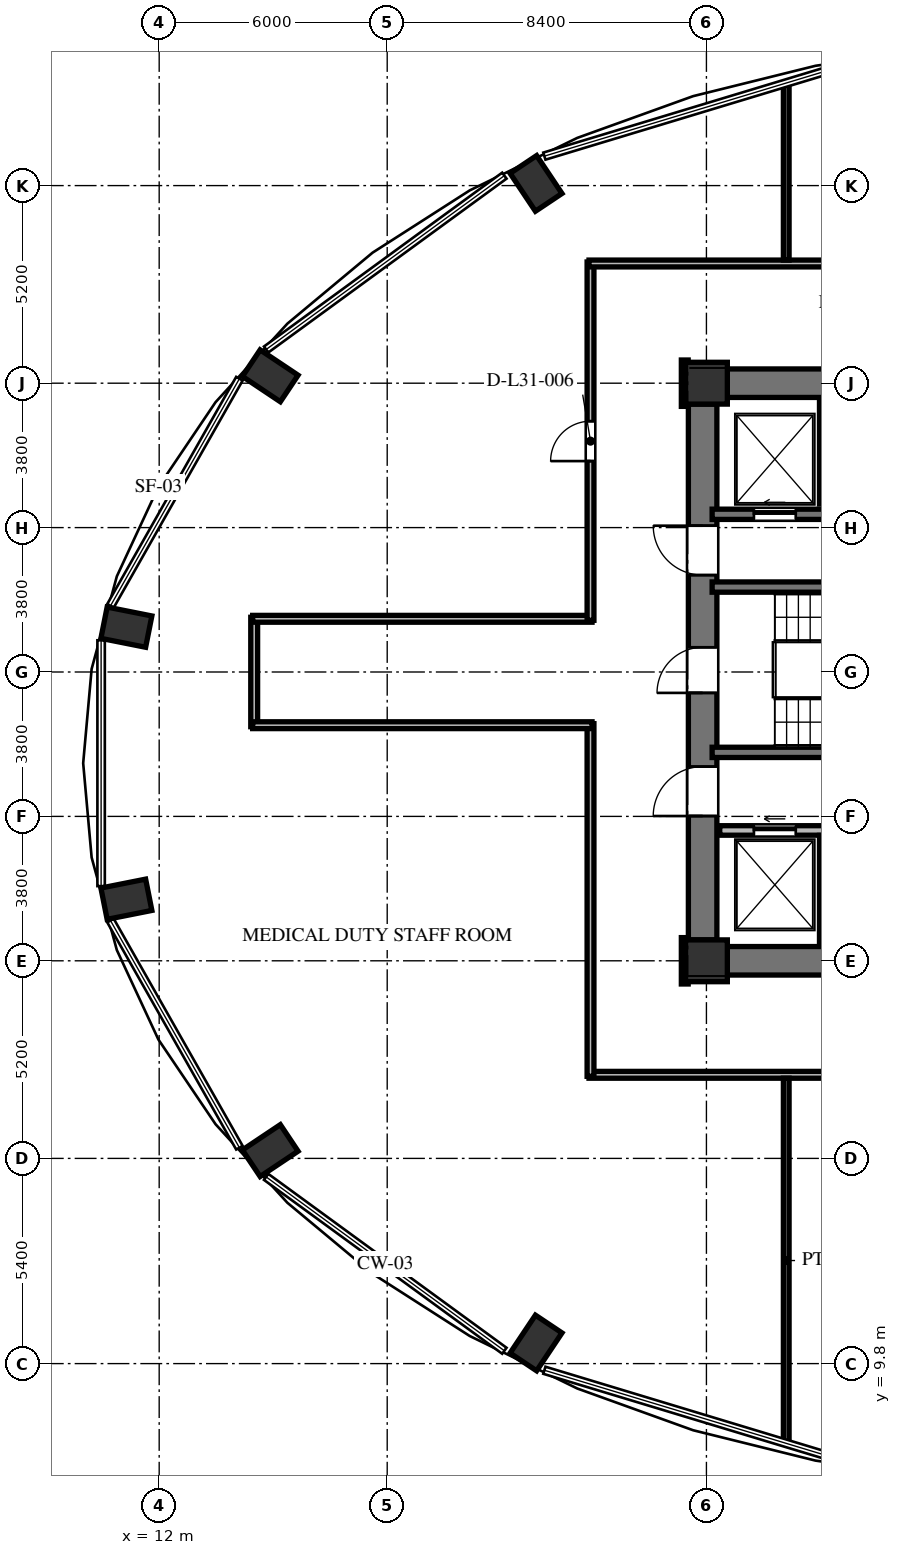
"""IFC4 building model, lengths in metres.
Left out: names, types, materials, properties, quantities, classifications, styles, units other than length and angle.
Written with IfcOpenShell. Run it as: python <this file> out.ifc"""

import sys

from ifc_helpers import new_model, si_unit, direction, frame, frame_2d, origin, origin_2d, place, context, subcontext, project, spatial, rectangle, extrude, element, fill, save


model = new_model("IFC4")
c1 = context("Model", 3, precision=1e-05, world=origin(), true_north=direction((0.0, 1.0)))
c2 = subcontext(c1, "Body", "Model", "MODEL_VIEW")
j1 = project(units=[si_unit("LENGTHUNIT", "METRE"), si_unit("PLANEANGLEUNIT", "RADIAN")], contexts=[c1])
p1 = place(None, origin())
s1 = spatial("IfcSite", under=j1, at=p1, CompositionType="ELEMENT")
p2 = place(p1, origin())
s2 = spatial("IfcBuilding", under=s1, at=p2, CompositionType="ELEMENT")
p3 = place(p2, frame((0.0, 0.0, 121.872)))
s3 = spatial("IfcBuildingStorey", under=s2, at=p3, CompositionType="ELEMENT", Elevation=121.872)
for number, where, z_axis, x_axis in (
    (1, (21.916, 40.857, 0.0), (0.0, 0.0, 1.0), (-0.556, 0.831, 0.0)),
    (2, (14.922, 35.795, 0.0), (0.0, 0.0, 1.0), (-0.831, 0.556, 0.0)),
    (3, (11.137, 29.18, 0.0), (0.0, 0.0, 1.0), (-0.981, 0.195, 0.0)),
    (4, (11.137, 22.02, 0.0), (0.0, 0.0, 1.0), (-0.981, -0.195, 0.0)),
    (5, (14.922, 15.405, 0.0), (0.0, 0.0, 1.0), (-0.831, -0.556, 0.0)),
    (6, (21.916, 10.343, 0.0), (0.0, 0.0, 1.0), (-0.556, -0.831, 0.0)),
):
    element("IfcColumn", number, at=place(p3, frame(where, z_axis=z_axis, x_axis=x_axis)), inside=s3, PredefinedType="COLUMN", context=c2, shape_type="SweptSolid", body=[
        extrude(rectangle(XDim=1.2, YDim=0.84, at=origin_2d()), origin(), (0.0, 0.0, 1.0), 3.648),
    ])
for number, where, z_axis, x_axis in (
    (7, (26.4, 20.4, 0.0), (0.0, 0.0, 1.0), (1.0, 0.0, 0.0)),
    (8, (26.4, 35.6, 0.0), (0.0, 0.0, 1.0), (1.0, 0.0, 0.0)),
):
    element("IfcColumn", number, at=place(p3, frame(where, z_axis=z_axis, x_axis=x_axis)), inside=s3, PredefinedType="COLUMN", context=c2, shape_type="SweptSolid", body=[
        extrude(rectangle(XDim=1.1, YDim=1.1, at=origin_2d()), origin(), (0.0, 0.0, 1.0), 3.648),
    ])
p4 = place(p3, frame((26.3, 20.95, 0.0), z_axis=(0.0, 0.0, 1.0), x_axis=(0.0, 1.0, 0.0)))
e9 = element("IfcWall", 9, at=p4, inside=s3, PredefinedType="SHEAR", context=c2, shape_type="SweptSolid", body=[
    extrude(rectangle(XDim=14.1, YDim=0.75, at=frame_2d((7.05, 0.0))), origin(), (0.0, 0.0, 1.0), 3.648),
])
p5 = place(p4, frame((6.5, 0.0, 0.0)))
e10 = element("IfcOpeningElement", 10, at=p5, cuts=e9, PredefinedType="OPENING", context=c2, shape_type="SweptSolid", body=[
    extrude(rectangle(XDim=1.2, YDim=2.15, at=frame_2d((0.6, 1.075))), frame((0.0, 0.385, 0.0), z_axis=(0.0, -1.0, 0.0), x_axis=(1.0, 0.0, 0.0)), (0.0, 0.0, 1.0), 0.77),
])
p6 = place(p4, frame((9.6, 0.0, 0.0)))
e11 = element("IfcOpeningElement", 11, at=p6, cuts=e9, PredefinedType="OPENING", context=c2, shape_type="SweptSolid", body=[
    extrude(rectangle(XDim=1.3, YDim=2.2, at=frame_2d((0.65, 1.1))), frame((0.0, 0.385, 0.0), z_axis=(0.0, -1.0, 0.0), x_axis=(1.0, 0.0, 0.0)), (0.0, 0.0, 1.0), 0.77),
])
p7 = place(p4, frame((3.26, 0.0, 0.0)))
e12 = element("IfcOpeningElement", 12, at=p7, cuts=e9, PredefinedType="OPENING", context=c2, shape_type="SweptSolid", body=[
    extrude(rectangle(XDim=1.3, YDim=2.2, at=frame_2d((0.65, 1.1))), frame((0.0, 0.385, 0.0), z_axis=(0.0, -1.0, 0.0), x_axis=(1.0, 0.0, 0.0)), (0.0, 0.0, 1.0), 0.77),
])
for number, where, z_axis, x_axis in (
    (13, (26.95, 20.4, 0.0), (0.0, 0.0, 1.0), (1.0, 0.0, 0.0)),
    (14, (26.95, 35.6, 0.0), (0.0, 0.0, 1.0), (1.0, 0.0, 0.0)),
):
    element("IfcWall", number, at=place(p3, frame(where, z_axis=z_axis, x_axis=x_axis)), inside=s3, PredefinedType="SHEAR", context=c2, shape_type="SweptSolid", body=[
        extrude(rectangle(XDim=5.375, YDim=0.75, at=frame_2d((2.688, 0.0))), origin(), (0.0, 0.0, 1.0), 3.648),
    ])
for number, where, z_axis, x_axis in (
    (15, (26.55, 30.235, 0.0), (0.0, 0.0, 1.0), (1.0, 0.0, 0.0)),
    (16, (26.55, 25.885, 0.0), (0.0, 0.0, 1.0), (1.0, 0.0, 0.0)),
):
    element("IfcWall", number, at=place(p3, frame(where, z_axis=z_axis, x_axis=x_axis)), inside=s3, PredefinedType="SHEAR", context=c2, shape_type="SweptSolid", body=[
        extrude(rectangle(XDim=7.985, YDim=0.27, at=frame_2d((3.992, 0.0))), origin(), (0.0, 0.0, 1.0), 3.648),
    ])
p8 = place(p3, frame((26.55, 32.15, 0.0), z_axis=(0.0, 0.0, 1.0), x_axis=(1.0, 0.0, 0.0)))
e17 = element("IfcWall", 17, at=p8, inside=s3, PredefinedType="SHEAR", context=c2, shape_type="SweptSolid", body=[
    extrude(rectangle(XDim=16.4, YDim=0.27, at=frame_2d((8.2, 0.0))), origin(), (0.0, 0.0, 1.0), 3.648),
])
p9 = place(p8, frame((1.1, 0.0, 0.0)))
e18 = element("IfcOpeningElement", 18, at=p9, cuts=e17, PredefinedType="OPENING", context=c2, shape_type="SweptSolid", body=[
    extrude(rectangle(XDim=1.1, YDim=2.2, at=frame_2d((0.55, 1.1))), frame((0.0, 0.145, 0.0), z_axis=(0.0, -1.0, 0.0), x_axis=(1.0, 0.0, 0.0)), (0.0, 0.0, 1.0), 0.29),
])
p10 = place(p8, frame((3.7, 0.0, 0.0)))
e19 = element("IfcOpeningElement", 19, at=p10, cuts=e17, PredefinedType="OPENING", context=c2, shape_type="SweptSolid", body=[
    extrude(rectangle(XDim=1.1, YDim=2.2, at=frame_2d((0.55, 1.1))), frame((0.0, 0.145, 0.0), z_axis=(0.0, -1.0, 0.0), x_axis=(1.0, 0.0, 0.0)), (0.0, 0.0, 1.0), 0.29),
])
p11 = place(p8, frame((6.5, 0.0, 0.0)))
e20 = element("IfcOpeningElement", 20, at=p11, cuts=e17, PredefinedType="OPENING", context=c2, shape_type="SweptSolid", body=[
    extrude(rectangle(XDim=1.1, YDim=2.2, at=frame_2d((0.55, 1.1))), frame((0.0, 0.145, 0.0), z_axis=(0.0, -1.0, 0.0), x_axis=(1.0, 0.0, 0.0)), (0.0, 0.0, 1.0), 0.29),
])
p12 = place(p8, frame((9.1, 0.0, 0.0)))
e21 = element("IfcOpeningElement", 21, at=p12, cuts=e17, PredefinedType="OPENING", context=c2, shape_type="SweptSolid", body=[
    extrude(rectangle(XDim=1.1, YDim=2.2, at=frame_2d((0.55, 1.1))), frame((0.0, 0.145, 0.0), z_axis=(0.0, -1.0, 0.0), x_axis=(1.0, 0.0, 0.0)), (0.0, 0.0, 1.0), 0.29),
])
p13 = place(p8, frame((11.9, 0.0, 0.0)))
e22 = element("IfcOpeningElement", 22, at=p13, cuts=e17, PredefinedType="OPENING", context=c2, shape_type="SweptSolid", body=[
    extrude(rectangle(XDim=1.1, YDim=2.2, at=frame_2d((0.55, 1.1))), frame((0.0, 0.145, 0.0), z_axis=(0.0, -1.0, 0.0), x_axis=(1.0, 0.0, 0.0)), (0.0, 0.0, 1.0), 0.29),
])
p14 = place(p8, frame((14.5, 0.0, 0.0)))
e23 = element("IfcOpeningElement", 23, at=p14, cuts=e17, PredefinedType="OPENING", context=c2, shape_type="SweptSolid", body=[
    extrude(rectangle(XDim=1.1, YDim=2.2, at=frame_2d((0.55, 1.1))), frame((0.0, 0.145, 0.0), z_axis=(0.0, -1.0, 0.0), x_axis=(1.0, 0.0, 0.0)), (0.0, 0.0, 1.0), 0.29),
])
p15 = place(p3, frame((26.75, 23.83, 0.0), z_axis=(0.0, 0.0, 1.0), x_axis=(1.0, 0.0, 0.0)))
e24 = element("IfcWall", 24, at=p15, inside=s3, PredefinedType="SOLIDWALL", context=c2, shape_type="SweptSolid", body=[
    extrude(rectangle(XDim=16.2, YDim=0.25, at=frame_2d((8.1, 0.0))), origin(), (0.0, 0.0, 1.0), 3.428),
])
p16 = place(p15, frame((0.9, 0.0, 0.0)))
e25 = element("IfcOpeningElement", 25, at=p16, cuts=e24, PredefinedType="OPENING", context=c2, shape_type="SweptSolid", body=[
    extrude(rectangle(XDim=1.1, YDim=2.2, at=frame_2d((0.55, 1.1))), frame((0.0, 0.135, 0.0), z_axis=(0.0, -1.0, 0.0), x_axis=(1.0, 0.0, 0.0)), (0.0, 0.0, 1.0), 0.27),
])
p17 = place(p15, frame((3.5, 0.0, 0.0)))
e26 = element("IfcOpeningElement", 26, at=p17, cuts=e24, PredefinedType="OPENING", context=c2, shape_type="SweptSolid", body=[
    extrude(rectangle(XDim=1.1, YDim=2.2, at=frame_2d((0.55, 1.1))), frame((0.0, 0.135, 0.0), z_axis=(0.0, -1.0, 0.0), x_axis=(1.0, 0.0, 0.0)), (0.0, 0.0, 1.0), 0.27),
])
p18 = place(p15, frame((6.3, 0.0, 0.0)))
e27 = element("IfcOpeningElement", 27, at=p18, cuts=e24, PredefinedType="OPENING", context=c2, shape_type="SweptSolid", body=[
    extrude(rectangle(XDim=1.1, YDim=2.2, at=frame_2d((0.55, 1.1))), frame((0.0, 0.135, 0.0), z_axis=(0.0, -1.0, 0.0), x_axis=(1.0, 0.0, 0.0)), (0.0, 0.0, 1.0), 0.27),
])
p19 = place(p15, frame((8.9, 0.0, 0.0)))
e28 = element("IfcOpeningElement", 28, at=p19, cuts=e24, PredefinedType="OPENING", context=c2, shape_type="SweptSolid", body=[
    extrude(rectangle(XDim=1.1, YDim=2.2, at=frame_2d((0.55, 1.1))), frame((0.0, 0.135, 0.0), z_axis=(0.0, -1.0, 0.0), x_axis=(1.0, 0.0, 0.0)), (0.0, 0.0, 1.0), 0.27),
])
p20 = place(p15, frame((11.7, 0.0, 0.0)))
e29 = element("IfcOpeningElement", 29, at=p20, cuts=e24, PredefinedType="OPENING", context=c2, shape_type="SweptSolid", body=[
    extrude(rectangle(XDim=1.1, YDim=2.2, at=frame_2d((0.55, 1.1))), frame((0.0, 0.135, 0.0), z_axis=(0.0, -1.0, 0.0), x_axis=(1.0, 0.0, 0.0)), (0.0, 0.0, 1.0), 0.27),
])
p21 = place(p15, frame((14.15, 0.0, 0.0)))
e30 = element("IfcOpeningElement", 30, at=p21, cuts=e24, PredefinedType="OPENING", context=c2, shape_type="SweptSolid", body=[
    extrude(rectangle(XDim=1.4, YDim=2.3, at=frame_2d((0.7, 1.15))), frame((0.0, 0.135, 0.0), z_axis=(0.0, -1.0, 0.0), x_axis=(1.0, 0.0, 0.0)), (0.0, 0.0, 1.0), 0.27),
])
p22 = place(p3, frame((29.5, 32.42, 0.0), z_axis=(0.0, 0.0, 1.0), x_axis=(0.0, 1.0, 0.0)))
e31 = element("IfcWall", 31, at=p22, inside=s3, PredefinedType="SOLIDWALL", context=c2, shape_type="SweptSolid", body=[
    extrude(rectangle(XDim=2.68, YDim=0.25, at=frame_2d((1.34, 0.0))), origin(), (0.0, 0.0, 1.0), 3.428),
])
p23 = place(p3, frame((29.5, 20.9, 0.0), z_axis=(0.0, 0.0, 1.0), x_axis=(0.0, 1.0, 0.0)))
e32 = element("IfcWall", 32, at=p23, inside=s3, PredefinedType="SOLIDWALL", context=c2, shape_type="SweptSolid", body=[
    extrude(rectangle(XDim=2.8, YDim=0.25, at=frame_2d((1.4, 0.0))), origin(), (0.0, 0.0, 1.0), 3.428),
])
p24 = place(p3, frame((14.5, 26.56, 0.0), z_axis=(0.0, 0.0, 1.0), x_axis=(0.0, 1.0, 0.0)))
e33 = element("IfcWall", 33, at=p24, inside=s3, PredefinedType="PARTITIONING", context=c2, shape_type="SweptSolid", body=[
    extrude(rectangle(XDim=2.88, YDim=0.18, at=frame_2d((1.44, 0.0))), origin(), (0.0, 0.0, 1.0), 3.013),
])
p25 = place(p3, frame((14.46, 29.4, 0.0), z_axis=(0.0, 0.0, 1.0), x_axis=(1.0, 0.0, 0.0)))
e34 = element("IfcWall", 34, at=p25, inside=s3, PredefinedType="PARTITIONING", context=c2, shape_type="SweptSolid", body=[
    extrude(rectangle(XDim=8.93, YDim=0.18, at=frame_2d((4.465, 0.0))), origin(), (0.0, 0.0, 1.0), 3.428),
])
p26 = place(p3, frame((23.35, 29.36, 0.0), z_axis=(0.0, 0.0, 1.0), x_axis=(0.0, 1.0, 0.0)))
e35 = element("IfcWall", 35, at=p26, inside=s3, PredefinedType="PARTITIONING", context=c2, shape_type="SweptSolid", body=[
    extrude(rectangle(XDim=9.43, YDim=0.18, at=frame_2d((4.715, 0.0))), origin(), (0.0, 0.0, 1.0), 3.428),
])
p27 = place(p26, frame((4.19, 0.0, 0.0)))
e36 = element("IfcOpeningElement", 36, at=p27, cuts=e35, PredefinedType="OPENING", context=c2, shape_type="SweptSolid", body=[
    extrude(rectangle(XDim=1.05, YDim=2.15, at=frame_2d((0.525, 1.075))), frame((0.0, 0.1, 0.0), z_axis=(0.0, -1.0, 0.0), x_axis=(1.0, 0.0, 0.0)), (0.0, 0.0, 1.0), 0.2),
])
p28 = place(p3, frame((23.31, 38.75, 0.0), z_axis=(0.0, 0.0, 1.0), x_axis=(1.0, 0.0, 0.0)))
e37 = element("IfcWall", 37, at=p28, inside=s3, PredefinedType="PARTITIONING", context=c2, shape_type="SweptSolid", body=[
    extrude(rectangle(XDim=29.88, YDim=0.18, at=frame_2d((14.94, 0.0))), origin(), (0.0, 0.0, 1.0), 3.053),
])
p29 = place(p28, frame((26.101, 0.0, 0.0)))
e38 = element("IfcOpeningElement", 38, at=p29, cuts=e37, PredefinedType="OPENING", context=c2, shape_type="SweptSolid", body=[
    extrude(rectangle(XDim=1.05, YDim=2.15, at=frame_2d((0.525, 1.075))), frame((0.0, 0.1, 0.0), z_axis=(0.0, -1.0, 0.0), x_axis=(1.0, 0.0, 0.0)), (0.0, 0.0, 1.0), 0.2),
])
p30 = place(p28, frame((15.74, 0.0, 0.0)))
e39 = element("IfcOpeningElement", 39, at=p30, cuts=e37, PredefinedType="OPENING", context=c2, shape_type="SweptSolid", body=[
    extrude(rectangle(XDim=1.4, YDim=2.2, at=frame_2d((0.7, 1.1))), frame((0.0, 0.1, 0.0), z_axis=(0.0, -1.0, 0.0), x_axis=(1.0, 0.0, 0.0)), (0.0, 0.0, 1.0), 0.2),
])
p31 = place(p28, frame((6.665, 0.0, 0.0)))
e40 = element("IfcOpeningElement", 40, at=p31, cuts=e37, PredefinedType="OPENING", context=c2, shape_type="SweptSolid", body=[
    extrude(rectangle(XDim=1.05, YDim=2.15, at=frame_2d((0.525, 1.075))), frame((0.0, 0.1, 0.0), z_axis=(0.0, -1.0, 0.0), x_axis=(1.0, 0.0, 0.0)), (0.0, 0.0, 1.0), 0.2),
])
for number, where, z_axis, x_axis in (
    (41, (25.83, 36.21, 0.0), (0.0, 0.0, 1.0), (0.0, -1.0, 0.0)),
    (42, (25.83, 21.01, 0.0), (0.0, 0.0, 1.0), (0.0, -1.0, 0.0)),
):
    element("IfcWall", number, at=place(p3, frame(where, z_axis=z_axis, x_axis=x_axis)), inside=s3, PredefinedType="PARTITIONING", context=c2, shape_type="SweptSolid", body=[
        extrude(rectangle(XDim=1.22, YDim=0.18, at=frame_2d((0.61, 0.0))), origin(), (0.0, 0.0, 1.0), 3.428),
    ])
p32 = place(p3, frame((45.24, 17.4, 0.0), z_axis=(0.0, 0.0, 1.0), x_axis=(-1.0, 0.0, 0.0)))
e43 = element("IfcWall", 43, at=p32, inside=s3, PredefinedType="PARTITIONING", context=c2, shape_type="SweptSolid", body=[
    extrude(rectangle(XDim=21.93, YDim=0.18, at=frame_2d((10.965, 0.0))), origin(), (0.0, 0.0, 1.0), 3.053),
])
p33 = place(p32, frame((8.004, 0.0, 0.0)))
e44 = element("IfcOpeningElement", 44, at=p33, cuts=e43, PredefinedType="OPENING", context=c2, shape_type="SweptSolid", body=[
    extrude(rectangle(XDim=1.05, YDim=2.15, at=frame_2d((0.525, 1.075))), frame((0.0, 0.1, 0.0), z_axis=(0.0, -1.0, 0.0), x_axis=(1.0, 0.0, 0.0)), (0.0, 0.0, 1.0), 0.2),
])
p34 = place(p3, frame((23.35, 17.36, 0.0), z_axis=(0.0, 0.0, 1.0), x_axis=(0.0, 1.0, 0.0)))
e45 = element("IfcWall", 45, at=p34, inside=s3, PredefinedType="PARTITIONING", context=c2, shape_type="SweptSolid", body=[
    extrude(rectangle(XDim=9.28, YDim=0.18, at=frame_2d((4.64, 0.0))), origin(), (0.0, 0.0, 1.0), 3.428),
])
p35 = place(p3, frame((23.39, 26.6, 0.0), z_axis=(0.0, 0.0, 1.0), x_axis=(-1.0, 0.0, 0.0)))
e46 = element("IfcWall", 46, at=p35, inside=s3, PredefinedType="PARTITIONING", context=c2, shape_type="SweptSolid", body=[
    extrude(rectangle(XDim=8.93, YDim=0.18, at=frame_2d((4.465, 0.0))), origin(), (0.0, 0.0, 1.0), 3.428),
])
p36 = place(p3, frame((28.5, 38.84, 0.0), z_axis=(0.0, 0.0, 1.0), x_axis=(0.0, 1.0, 0.0)))
e47 = element("IfcWall", 47, at=p36, inside=s3, PredefinedType="PARTITIONING", context=c2, shape_type="SweptSolid", body=[
    extrude(rectangle(XDim=4.645, YDim=0.15, at=frame_2d((2.323, 0.0))), origin(), (0.0, 0.0, 1.0), 3.428),
])
p37 = place(p3, frame((28.5, 7.715, 0.0), z_axis=(0.0, 0.0, 1.0), x_axis=(0.0, 1.0, 0.0)))
e48 = element("IfcWall", 48, at=p37, inside=s3, PredefinedType="PARTITIONING", context=c2, shape_type="SweptSolid", body=[
    extrude(rectangle(XDim=9.595, YDim=0.15, at=frame_2d((4.797, 0.0))), origin(), (0.0, 0.0, 1.0), 3.428),
])
p38 = place(p5, origin())
e49 = element("IfcDoor", 49, at=p38, inside=s3, OperationType="SINGLE_SWING_LEFT", PredefinedType="DOOR", context=c2, shape_type="SweptSolid", body=[
    extrude(rectangle(XDim=1.2, YDim=2.15, at=frame_2d((0.6, 1.075))), frame((0.0, 0.025, 0.0), z_axis=(0.0, -1.0, 0.0), x_axis=(1.0, 0.0, 0.0)), (0.0, 0.0, 1.0), 0.05),
])
fill(e10, e49)
p39 = place(p6, origin())
e50 = element("IfcDoor", 50, at=p39, inside=s3, OperationType="SINGLE_SWING_RIGHT", PredefinedType="DOOR", context=c2, shape_type="SweptSolid", body=[
    extrude(rectangle(XDim=1.3, YDim=2.2, at=frame_2d((0.65, 1.1))), frame((0.0, 0.025, 0.0), z_axis=(0.0, -1.0, 0.0), x_axis=(1.0, 0.0, 0.0)), (0.0, 0.0, 1.0), 0.05),
])
fill(e11, e50)
p40 = place(p7, origin())
e51 = element("IfcDoor", 51, at=p40, inside=s3, OperationType="SINGLE_SWING_LEFT", PredefinedType="DOOR", context=c2, shape_type="SweptSolid", body=[
    extrude(rectangle(XDim=1.3, YDim=2.2, at=frame_2d((0.65, 1.1))), frame((0.0, 0.025, 0.0), z_axis=(0.0, -1.0, 0.0), x_axis=(1.0, 0.0, 0.0)), (0.0, 0.0, 1.0), 0.05),
])
fill(e12, e51)
p41 = place(p9, origin())
e52 = element("IfcDoor", 52, at=p41, inside=s3, OperationType="SLIDING_TO_LEFT", PredefinedType="DOOR", context=c2, shape_type="SweptSolid", body=[
    extrude(rectangle(XDim=1.1, YDim=2.2, at=frame_2d((0.55, 1.1))), frame((0.0, 0.025, 0.0), z_axis=(0.0, -1.0, 0.0), x_axis=(1.0, 0.0, 0.0)), (0.0, 0.0, 1.0), 0.05),
])
fill(e18, e52)
p42 = place(p16, origin())
e53 = element("IfcDoor", 53, at=p42, inside=s3, OperationType="SLIDING_TO_LEFT", PredefinedType="DOOR", context=c2, shape_type="SweptSolid", body=[
    extrude(rectangle(XDim=1.1, YDim=2.2, at=frame_2d((0.55, 1.1))), frame((0.0, 0.025, 0.0), z_axis=(0.0, -1.0, 0.0), x_axis=(1.0, 0.0, 0.0)), (0.0, 0.0, 1.0), 0.05),
])
fill(e25, e53)
p43 = place(p27, origin())
e54 = element("IfcDoor", 54, at=p43, inside=s3, OperationType="SINGLE_SWING_LEFT", PredefinedType="DOOR", context=c2, shape_type="SweptSolid", body=[
    extrude(rectangle(XDim=1.05, YDim=2.15, at=frame_2d((0.525, 1.075))), frame((0.0, 0.025, 0.0), z_axis=(0.0, -1.0, 0.0), x_axis=(1.0, 0.0, 0.0)), (0.0, 0.0, 1.0), 0.05),
])
fill(e36, e54)
save(model, sys.argv[1])
